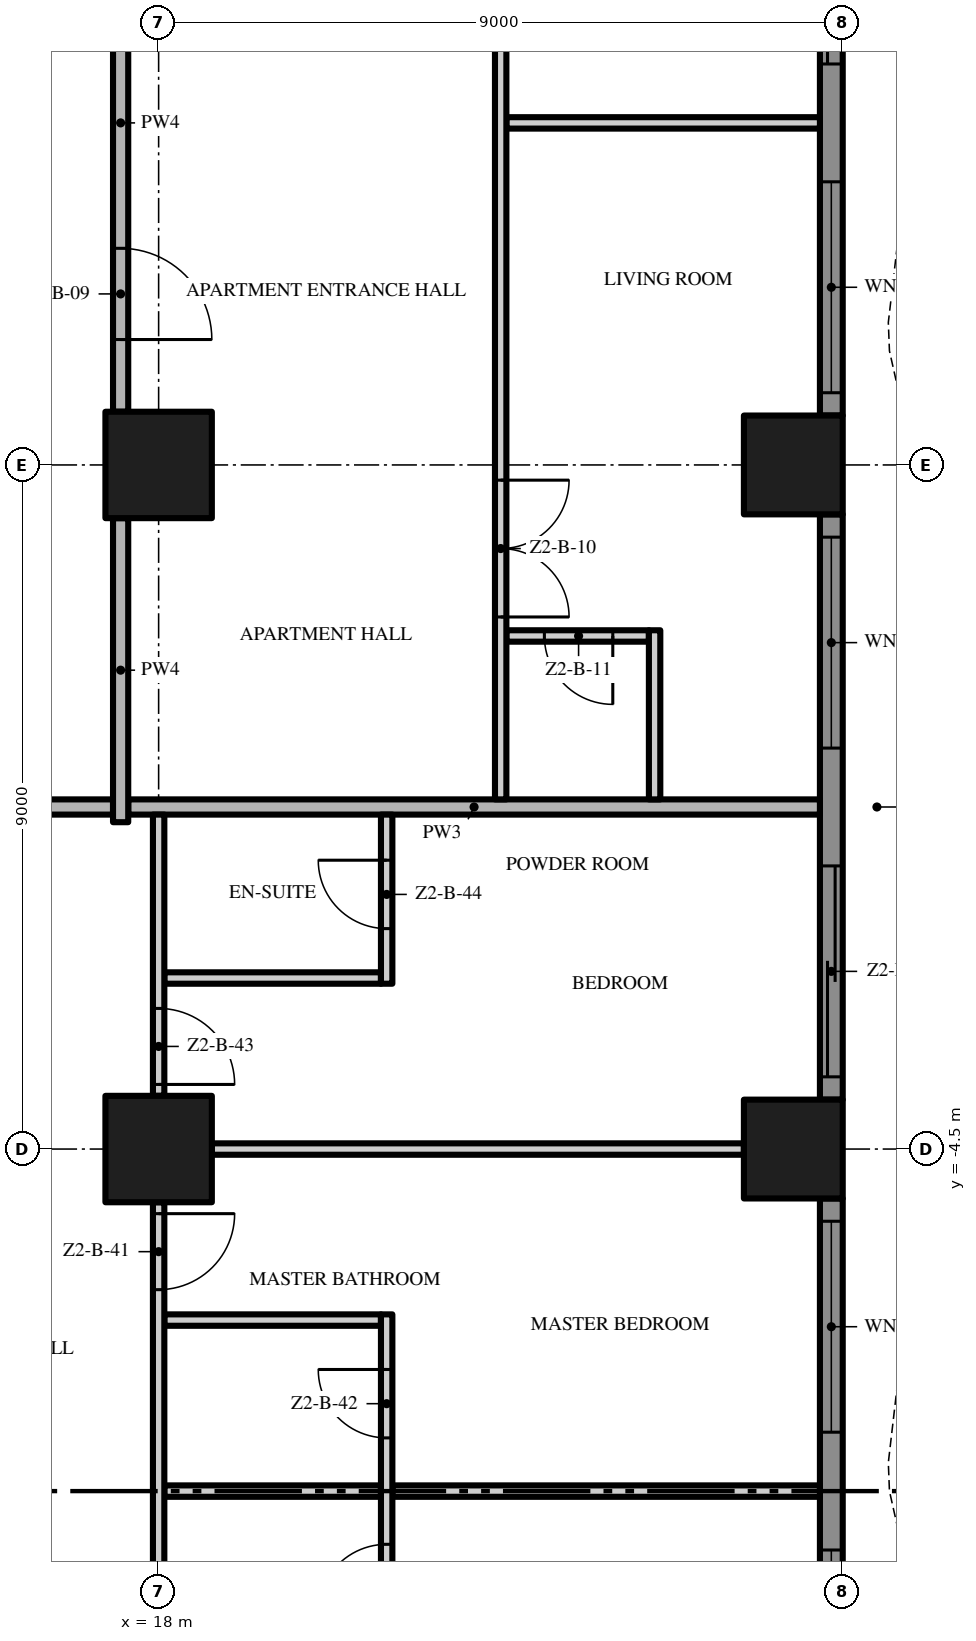
"""IFC4 building model, lengths in metres.
Left out: names, types, materials, properties, quantities, classifications, styles, units other than length and angle.
Written with IfcOpenShell. Run it as: python <this file> out.ifc"""

import sys

from ifc_helpers import new_model, si_unit, direction, frame, frame_2d, origin, origin_2d, place, context, subcontext, project, spatial, polyline, rectangle, outline, extrude, element, fill, save


model = new_model("IFC4")
c1 = context("Model", 3, precision=1e-05, world=origin(), true_north=direction((0.0, 1.0)))
c2 = subcontext(c1, "Body", "Model", "MODEL_VIEW")
j1 = project(units=[si_unit("LENGTHUNIT", "METRE"), si_unit("PLANEANGLEUNIT", "RADIAN")], contexts=[c1])
p1 = place(None, origin())
s1 = spatial("IfcSite", under=j1, at=p1, CompositionType="ELEMENT")
p2 = place(p1, origin())
s2 = spatial("IfcBuilding", under=s1, at=p2, CompositionType="ELEMENT")
p3 = place(p2, frame((0.0, 0.0, 80.8)))
s3 = spatial("IfcBuildingStorey", under=s2, at=p3, CompositionType="ELEMENT", Elevation=80.8)
for number, where, z_axis, x_axis in (
    (1, (18.0, -4.5, 0.0), (0.0, 0.0, 1.0), (1.0, 0.0, 0.0)),
    (2, (18.0, 4.5, 0.0), (0.0, 0.0, 1.0), (1.0, 0.0, 0.0)),
):
    element("IfcColumn", number, at=place(p3, frame(where, z_axis=z_axis, x_axis=x_axis)), inside=s3, PredefinedType="COLUMN", context=c2, shape_type="SweptSolid", body=[
        extrude(rectangle(XDim=1.4, YDim=1.4, at=origin_2d()), origin(), (0.0, 0.0, 1.0), 3.5),
    ])
for number, where, z_axis, x_axis in (
    (3, (26.35, -4.5, 0.0), (0.0, 0.0, 1.0), (1.0, 0.0, 0.0)),
    (4, (26.35, 4.5, 0.0), (0.0, 0.0, 1.0), (1.0, 0.0, 0.0)),
):
    element("IfcColumn", number, at=place(p3, frame(where, z_axis=z_axis, x_axis=x_axis)), inside=s3, PredefinedType="COLUMN", context=c2, shape_type="SweptSolid", body=[
        extrude(rectangle(XDim=1.3, YDim=1.3, at=origin_2d()), origin(), (0.0, 0.0, 1.0), 3.5),
    ])
p4 = place(p3, frame((26.85, -5.15, 0.0), z_axis=(0.0, 0.0, 1.0), x_axis=(0.0, -1.0, 0.0)))
e5 = element("IfcWall", 5, at=p4, inside=s3, PredefinedType="SOLIDWALL", context=c2, shape_type="SweptSolid", body=[
    extrude(rectangle(XDim=7.7, YDim=0.3, at=frame_2d((3.85, 0.0))), origin(), (0.0, 0.0, 1.0), 3.5),
])
p5 = place(p4, frame((4.625, 0.0, 0.45)))
e6 = element("IfcOpeningElement", 6, at=p5, cuts=e5, PredefinedType="OPENING", context=c2, shape_type="SweptSolid", body=[
    extrude(rectangle(XDim=2.775, YDim=2.65, at=frame_2d((1.387, 1.325))), frame((0.0, 0.16, 0.0), z_axis=(0.0, -1.0, 0.0), x_axis=(1.0, 0.0, 0.0)), (0.0, 0.0, 1.0), 0.32),
])
p6 = place(p4, frame((0.3, 0.0, 0.45)))
e7 = element("IfcOpeningElement", 7, at=p6, cuts=e5, PredefinedType="OPENING", context=c2, shape_type="SweptSolid", body=[
    extrude(rectangle(XDim=2.775, YDim=2.65, at=frame_2d((1.387, 1.325))), frame((0.0, 0.16, 0.0), z_axis=(0.0, -1.0, 0.0), x_axis=(1.0, 0.0, 0.0)), (0.0, 0.0, 1.0), 0.32),
])
p7 = place(p3, frame((26.85, 3.85, 0.0), z_axis=(0.0, 0.0, 1.0), x_axis=(0.0, -1.0, 0.0)))
e8 = element("IfcWall", 8, at=p7, inside=s3, PredefinedType="SOLIDWALL", context=c2, shape_type="SweptSolid", body=[
    extrude(rectangle(XDim=7.7, YDim=0.3, at=frame_2d((3.85, 0.0))), origin(), (0.0, 0.0, 1.0), 3.5),
])
p8 = place(p7, frame((4.625, 0.0, 0.0)))
e9 = element("IfcOpeningElement", 9, at=p8, cuts=e8, PredefinedType="OPENING", context=c2, shape_type="SweptSolid", body=[
    extrude(rectangle(XDim=2.775, YDim=2.4, at=frame_2d((1.387, 1.2))), frame((0.0, 0.16, 0.0), z_axis=(0.0, -1.0, 0.0), x_axis=(1.0, 0.0, 0.0)), (0.0, 0.0, 1.0), 0.32),
])
p9 = place(p7, frame((0.3, 0.0, 0.45)))
e10 = element("IfcOpeningElement", 10, at=p9, cuts=e8, PredefinedType="OPENING", context=c2, shape_type="SweptSolid", body=[
    extrude(rectangle(XDim=2.775, YDim=2.65, at=frame_2d((1.387, 1.325))), frame((0.0, 0.16, 0.0), z_axis=(0.0, -1.0, 0.0), x_axis=(1.0, 0.0, 0.0)), (0.0, 0.0, 1.0), 0.32),
])
p10 = place(p3, frame((26.85, 12.85, 0.0), z_axis=(0.0, 0.0, 1.0), x_axis=(0.0, -1.0, 0.0)))
e11 = element("IfcWall", 11, at=p10, inside=s3, PredefinedType="SOLIDWALL", context=c2, shape_type="SweptSolid", body=[
    extrude(rectangle(XDim=7.7, YDim=0.3, at=frame_2d((3.85, 0.0))), origin(), (0.0, 0.0, 1.0), 3.5),
])
p11 = place(p10, frame((4.625, 0.0, 0.45)))
e12 = element("IfcOpeningElement", 12, at=p11, cuts=e11, PredefinedType="OPENING", context=c2, shape_type="SweptSolid", body=[
    extrude(rectangle(XDim=2.775, YDim=2.65, at=frame_2d((1.387, 1.325))), frame((0.0, 0.16, 0.0), z_axis=(0.0, -1.0, 0.0), x_axis=(1.0, 0.0, 0.0)), (0.0, 0.0, 1.0), 0.32),
])
p12 = place(p10, frame((0.3, 0.0, 0.0)))
e13 = element("IfcOpeningElement", 13, at=p12, cuts=e11, PredefinedType="OPENING", context=c2, shape_type="SweptSolid", body=[
    extrude(rectangle(XDim=2.775, YDim=2.4, at=frame_2d((1.387, 1.2))), frame((0.0, 0.16, 0.0), z_axis=(0.0, -1.0, 0.0), x_axis=(1.0, 0.0, 0.0)), (0.0, 0.0, 1.0), 0.32),
])
p13 = place(p3, origin())
e14 = element("IfcWall", 14, at=p13, inside=s3, PredefinedType="USERDEFINED", context=c2, shape_type="SweptSolid", body=[
    extrude(outline(polyline([(29.649, -18.0), (29.985, -16.5), (30.0, -16.125), (29.869, -15.0), (29.345, -13.5), (28.612, -12.0), (27.951, -10.5), (27.615, -9.0), (27.6, -8.625), (27.731, -7.5), (28.255, -6.0), (28.988, -4.5), (29.649, -3.0), (29.985, -1.5), (30.0, -1.125), (29.869, 0.0), (29.345, 1.5), (28.612, 3.0), (27.951, 4.5), (27.615, 6.0), (27.6, 6.375), (27.731, 7.5), (28.255, 9.0), (28.988, 10.5), (29.649, 12.0), (29.985, 13.5), (30.0, 13.875), (29.869, 15.0), (29.345, 16.5), (28.612, 18.0), (28.388, 17.89), (29.114, 16.404), (29.624, 14.944), (29.749, 13.865), (29.736, 13.533), (29.41, 12.079), (28.761, 10.605), (28.024, 9.096), (27.486, 7.556), (27.349, 6.385), (27.366, 5.967), (27.713, 4.421), (28.385, 2.895), (29.114, 1.404), (29.624, -0.056), (29.749, -1.135), (29.736, -1.467), (29.41, -2.921), (28.761, -4.395), (28.024, -5.904), (27.486, -7.444), (27.349, -8.615), (27.366, -9.033), (27.713, -10.579), (28.385, -12.105), (29.114, -13.596), (29.624, -15.056), (29.749, -16.135), (29.736, -16.467), (29.405, -17.945), (29.649, -18.0)])), origin(), (0.0, 0.0, 1.0), 0.9),
])
p14 = place(p3, frame((18.075, -9.0, 0.0), z_axis=(0.0, 0.0, 1.0), x_axis=(1.0, 0.0, 0.0)))
e15 = element("IfcWall", 15, at=p14, inside=s3, PredefinedType="PARTITIONING", context=c2, shape_type="SweptSolid", body=[
    extrude(rectangle(XDim=2.85, YDim=0.15, at=frame_2d((1.425, 0.0))), origin(), (0.0, 0.0, 1.0), 3.5),
])
p15 = place(p3, frame((21.075, -9.0, 0.0), z_axis=(0.0, 0.0, 1.0), x_axis=(1.0, 0.0, 0.0)))
e16 = element("IfcWall", 16, at=p15, inside=s3, PredefinedType="PARTITIONING", context=c2, shape_type="SweptSolid", body=[
    extrude(rectangle(XDim=5.625, YDim=0.15, at=frame_2d((2.812, 0.0))), origin(), (0.0, 0.0, 1.0), 3.5),
])
p16 = place(p3, frame((18.075, -6.75, 0.0), z_axis=(0.0, 0.0, 1.0), x_axis=(1.0, 0.0, 0.0)))
e17 = element("IfcWall", 17, at=p16, inside=s3, PredefinedType="PARTITIONING", context=c2, shape_type="SweptSolid", body=[
    extrude(rectangle(XDim=2.85, YDim=0.15, at=frame_2d((1.425, 0.0))), origin(), (0.0, 0.0, 1.0), 3.5),
])
p17 = place(p3, frame((18.7, -4.5, 0.0), z_axis=(0.0, 0.0, 1.0), x_axis=(1.0, 0.0, 0.0)))
e18 = element("IfcWall", 18, at=p17, inside=s3, PredefinedType="PARTITIONING", context=c2, shape_type="SweptSolid", body=[
    extrude(rectangle(XDim=7.0, YDim=0.15, at=frame_2d((3.5, 0.0))), origin(), (0.0, 0.0, 1.0), 3.5),
])
p18 = place(p3, frame((18.075, -2.25, 0.0), z_axis=(0.0, 0.0, 1.0), x_axis=(1.0, 0.0, 0.0)))
e19 = element("IfcWall", 19, at=p18, inside=s3, PredefinedType="PARTITIONING", context=c2, shape_type="SweptSolid", body=[
    extrude(rectangle(XDim=2.85, YDim=0.15, at=frame_2d((1.425, 0.0))), origin(), (0.0, 0.0, 1.0), 3.5),
])
p19 = place(p3, frame((4.6, 0.0, 0.0), z_axis=(0.0, 0.0, 1.0), x_axis=(1.0, 0.0, 0.0)))
e20 = element("IfcWall", 20, at=p19, inside=s3, PredefinedType="PARTITIONING", context=c2, shape_type="SweptSolid", body=[
    extrude(rectangle(XDim=12.8, YDim=0.2, at=frame_2d((6.4, 0.0))), origin(), (0.0, 0.0, 1.0), 3.5),
])
p20 = place(p3, frame((17.6, 0.0, 0.0), z_axis=(0.0, 0.0, 1.0), x_axis=(1.0, 0.0, 0.0)))
e21 = element("IfcWall", 21, at=p20, inside=s3, PredefinedType="PARTITIONING", context=c2, shape_type="SweptSolid", body=[
    extrude(rectangle(XDim=9.1, YDim=0.2, at=frame_2d((4.55, 0.0))), origin(), (0.0, 0.0, 1.0), 3.5),
])
p21 = place(p3, frame((24.45, 2.25, 0.0), z_axis=(0.0, 0.0, 1.0), x_axis=(-1.0, 0.0, 0.0)))
e22 = element("IfcWall", 22, at=p21, inside=s3, PredefinedType="PARTITIONING", context=c2, shape_type="SweptSolid", body=[
    extrude(rectangle(XDim=1.875, YDim=0.15, at=frame_2d((0.938, 0.0))), origin(), (0.0, 0.0, 1.0), 3.5),
])
p22 = place(p21, frame((0.475, 0.0, 0.0)))
e23 = element("IfcOpeningElement", 23, at=p22, cuts=e22, PredefinedType="OPENING", context=c2, shape_type="SweptSolid", body=[
    extrude(rectangle(XDim=0.9, YDim=2.1, at=frame_2d((0.45, 1.05))), frame((0.0, 0.085, 0.0), z_axis=(0.0, -1.0, 0.0), x_axis=(1.0, 0.0, 0.0)), (0.0, 0.0, 1.0), 0.17),
])
p23 = place(p3, frame((22.575, 9.0, 0.0), z_axis=(0.0, 0.0, 1.0), x_axis=(1.0, 0.0, 0.0)))
e24 = element("IfcWall", 24, at=p23, inside=s3, PredefinedType="PARTITIONING", context=c2, shape_type="SweptSolid", body=[
    extrude(rectangle(XDim=4.125, YDim=0.15, at=frame_2d((2.062, 0.0))), origin(), (0.0, 0.0, 1.0), 3.5),
])
p24 = place(p3, frame((17.5, -0.2, 0.0), z_axis=(0.0, 0.0, 1.0), x_axis=(0.0, 1.0, 0.0)))
e25 = element("IfcWall", 25, at=p24, inside=s3, PredefinedType="PARTITIONING", context=c2, shape_type="SweptSolid", body=[
    extrude(rectangle(XDim=4.0, YDim=0.2, at=frame_2d((2.0, 0.0))), origin(), (0.0, 0.0, 1.0), 3.5),
])
p25 = place(p3, frame((17.5, 12.8, 0.0), z_axis=(0.0, 0.0, 1.0), x_axis=(0.0, -1.0, 0.0)))
e26 = element("IfcWall", 26, at=p25, inside=s3, PredefinedType="PARTITIONING", context=c2, shape_type="SweptSolid", body=[
    extrude(rectangle(XDim=7.6, YDim=0.2, at=frame_2d((3.8, 0.0))), origin(), (0.0, 0.0, 1.0), 3.5),
])
p26 = place(p25, frame((5.45, 0.0, 0.0)))
e27 = element("IfcOpeningElement", 27, at=p26, cuts=e26, PredefinedType="OPENING", context=c2, shape_type="SweptSolid", body=[
    extrude(rectangle(XDim=1.2, YDim=2.4, at=frame_2d((0.6, 1.2))), frame((0.0, 0.11, 0.0), z_axis=(0.0, -1.0, 0.0), x_axis=(1.0, 0.0, 0.0)), (0.0, 0.0, 1.0), 0.22),
])
p27 = place(p3, frame((18.0, -5.2, 0.0), z_axis=(0.0, 0.0, 1.0), x_axis=(0.0, -1.0, 0.0)))
e28 = element("IfcWall", 28, at=p27, inside=s3, PredefinedType="PARTITIONING", context=c2, shape_type="SweptSolid", body=[
    extrude(rectangle(XDim=7.6, YDim=0.15, at=frame_2d((3.8, 0.0))), origin(), (0.0, 0.0, 1.0), 3.5),
])
p28 = place(p27, frame((0.15, 0.0, 0.0)))
e29 = element("IfcOpeningElement", 29, at=p28, cuts=e28, PredefinedType="OPENING", context=c2, shape_type="SweptSolid", body=[
    extrude(rectangle(XDim=1.0, YDim=2.4, at=frame_2d((0.5, 1.2))), frame((0.0, 0.085, 0.0), z_axis=(0.0, -1.0, 0.0), x_axis=(1.0, 0.0, 0.0)), (0.0, 0.0, 1.0), 0.17),
])
p29 = place(p3, frame((18.0, -0.1, 0.0), z_axis=(0.0, 0.0, 1.0), x_axis=(0.0, -1.0, 0.0)))
e30 = element("IfcWall", 30, at=p29, inside=s3, PredefinedType="PARTITIONING", context=c2, shape_type="SweptSolid", body=[
    extrude(rectangle(XDim=3.7, YDim=0.15, at=frame_2d((1.85, 0.0))), origin(), (0.0, 0.0, 1.0), 3.5),
])
p30 = place(p29, frame((2.55, 0.0, 0.0)))
e31 = element("IfcOpeningElement", 31, at=p30, cuts=e30, PredefinedType="OPENING", context=c2, shape_type="SweptSolid", body=[
    extrude(rectangle(XDim=1.0, YDim=2.4, at=frame_2d((0.5, 1.2))), frame((0.0, 0.085, 0.0), z_axis=(0.0, -1.0, 0.0), x_axis=(1.0, 0.0, 0.0)), (0.0, 0.0, 1.0), 0.17),
])
p31 = place(p3, frame((21.0, -11.325, 0.0), z_axis=(0.0, 0.0, 1.0), x_axis=(0.0, 1.0, 0.0)))
e32 = element("IfcWall", 32, at=p31, inside=s3, PredefinedType="PARTITIONING", context=c2, shape_type="SweptSolid", body=[
    extrude(rectangle(XDim=4.65, YDim=0.15, at=frame_2d((2.325, 0.0))), origin(), (0.0, 0.0, 1.0), 3.5),
])
p32 = place(p31, frame((0.725, 0.0, 0.0)))
e33 = element("IfcOpeningElement", 33, at=p32, cuts=e32, PredefinedType="OPENING", context=c2, shape_type="SweptSolid", body=[
    extrude(rectangle(XDim=0.9, YDim=2.1, at=frame_2d((0.45, 1.05))), frame((0.0, 0.085, 0.0), z_axis=(0.0, -1.0, 0.0), x_axis=(1.0, 0.0, 0.0)), (0.0, 0.0, 1.0), 0.17),
])
p33 = place(p31, frame((3.025, 0.0, 0.0)))
e34 = element("IfcOpeningElement", 34, at=p33, cuts=e32, PredefinedType="OPENING", context=c2, shape_type="SweptSolid", body=[
    extrude(rectangle(XDim=0.9, YDim=2.1, at=frame_2d((0.45, 1.05))), frame((0.0, 0.085, 0.0), z_axis=(0.0, -1.0, 0.0), x_axis=(1.0, 0.0, 0.0)), (0.0, 0.0, 1.0), 0.17),
])
p34 = place(p3, frame((21.0, -2.325, 0.0), z_axis=(0.0, 0.0, 1.0), x_axis=(0.0, 1.0, 0.0)))
e35 = element("IfcWall", 35, at=p34, inside=s3, PredefinedType="PARTITIONING", context=c2, shape_type="SweptSolid", body=[
    extrude(rectangle(XDim=2.225, YDim=0.15, at=frame_2d((1.113, 0.0))), origin(), (0.0, 0.0, 1.0), 3.5),
])
p35 = place(p34, frame((0.725, 0.0, 0.0)))
e36 = element("IfcOpeningElement", 36, at=p35, cuts=e35, PredefinedType="OPENING", context=c2, shape_type="SweptSolid", body=[
    extrude(rectangle(XDim=0.9, YDim=2.1, at=frame_2d((0.45, 1.05))), frame((0.0, 0.085, 0.0), z_axis=(0.0, -1.0, 0.0), x_axis=(1.0, 0.0, 0.0)), (0.0, 0.0, 1.0), 0.17),
])
p36 = place(p3, frame((22.5, 17.35, 0.0), z_axis=(0.0, 0.0, 1.0), x_axis=(0.0, -1.0, 0.0)))
e37 = element("IfcWall", 37, at=p36, inside=s3, PredefinedType="PARTITIONING", context=c2, shape_type="SweptSolid", body=[
    extrude(rectangle(XDim=17.25, YDim=0.15, at=frame_2d((8.625, 0.0))), origin(), (0.0, 0.0, 1.0), 3.5),
])
p37 = place(p36, frame((13.05, 0.0, 0.0)))
e38 = element("IfcOpeningElement", 38, at=p37, cuts=e37, PredefinedType="OPENING", context=c2, shape_type="SweptSolid", body=[
    extrude(rectangle(XDim=1.8, YDim=2.4, at=frame_2d((0.9, 1.2))), frame((0.0, 0.085, 0.0), z_axis=(0.0, -1.0, 0.0), x_axis=(1.0, 0.0, 0.0)), (0.0, 0.0, 1.0), 0.17),
])
p38 = place(p36, frame((5.6, 0.0, 0.0)))
e39 = element("IfcOpeningElement", 39, at=p38, cuts=e37, PredefinedType="OPENING", context=c2, shape_type="SweptSolid", body=[
    extrude(rectangle(XDim=1.0, YDim=2.4, at=frame_2d((0.5, 1.2))), frame((0.0, 0.085, 0.0), z_axis=(0.0, -1.0, 0.0), x_axis=(1.0, 0.0, 0.0)), (0.0, 0.0, 1.0), 0.17),
])
p39 = place(p3, frame((24.525, 0.1, 0.0), z_axis=(0.0, 0.0, 1.0), x_axis=(0.0, 1.0, 0.0)))
e40 = element("IfcWall", 40, at=p39, inside=s3, PredefinedType="PARTITIONING", context=c2, shape_type="SweptSolid", body=[
    extrude(rectangle(XDim=2.225, YDim=0.15, at=frame_2d((1.113, 0.0))), origin(), (0.0, 0.0, 1.0), 3.5),
])
p40 = place(p5, origin())
e41 = element("IfcWindow", 41, at=p40, inside=s3, PartitioningType="SINGLE_PANEL", PredefinedType="WINDOW", context=c2, shape_type="SweptSolid", body=[
    extrude(rectangle(XDim=2.775, YDim=2.65, at=frame_2d((1.387, 1.325))), frame((0.0, 0.03, 0.0), z_axis=(0.0, -1.0, 0.0), x_axis=(1.0, 0.0, 0.0)), (0.0, 0.0, 1.0), 0.06),
])
fill(e6, e41)
p41 = place(p6, origin())
e42 = element("IfcWindow", 42, at=p41, inside=s3, PartitioningType="SINGLE_PANEL", PredefinedType="WINDOW", context=c2, shape_type="SweptSolid", body=[
    extrude(rectangle(XDim=2.775, YDim=2.65, at=frame_2d((1.387, 1.325))), frame((0.0, 0.03, 0.0), z_axis=(0.0, -1.0, 0.0), x_axis=(1.0, 0.0, 0.0)), (0.0, 0.0, 1.0), 0.06),
])
fill(e7, e42)
p42 = place(p8, origin())
e43 = element("IfcDoor", 43, at=p42, inside=s3, OperationType="SINGLE_SWING_LEFT", PredefinedType="DOOR", context=c2, shape_type="SweptSolid", body=[
    extrude(rectangle(XDim=2.775, YDim=2.4, at=frame_2d((1.387, 1.2))), frame((0.0, 0.025, 0.0), z_axis=(0.0, -1.0, 0.0), x_axis=(1.0, 0.0, 0.0)), (0.0, 0.0, 1.0), 0.05),
])
fill(e9, e43)
p43 = place(p9, origin())
e44 = element("IfcWindow", 44, at=p43, inside=s3, PartitioningType="SINGLE_PANEL", PredefinedType="WINDOW", context=c2, shape_type="SweptSolid", body=[
    extrude(rectangle(XDim=2.775, YDim=2.65, at=frame_2d((1.387, 1.325))), frame((0.0, 0.03, 0.0), z_axis=(0.0, -1.0, 0.0), x_axis=(1.0, 0.0, 0.0)), (0.0, 0.0, 1.0), 0.06),
])
fill(e10, e44)
p44 = place(p11, origin())
e45 = element("IfcWindow", 45, at=p44, inside=s3, PartitioningType="SINGLE_PANEL", PredefinedType="WINDOW", context=c2, shape_type="SweptSolid", body=[
    extrude(rectangle(XDim=2.775, YDim=2.65, at=frame_2d((1.387, 1.325))), frame((0.0, 0.03, 0.0), z_axis=(0.0, -1.0, 0.0), x_axis=(1.0, 0.0, 0.0)), (0.0, 0.0, 1.0), 0.06),
])
fill(e12, e45)
p45 = place(p12, origin())
e46 = element("IfcDoor", 46, at=p45, inside=s3, OperationType="SINGLE_SWING_LEFT", PredefinedType="DOOR", context=c2, shape_type="SweptSolid", body=[
    extrude(rectangle(XDim=2.775, YDim=2.4, at=frame_2d((1.387, 1.2))), frame((0.0, 0.025, 0.0), z_axis=(0.0, -1.0, 0.0), x_axis=(1.0, 0.0, 0.0)), (0.0, 0.0, 1.0), 0.05),
])
fill(e13, e46)
p46 = place(p26, origin())
e47 = element("IfcDoor", 47, at=p46, inside=s3, OperationType="SINGLE_SWING_RIGHT", PredefinedType="DOOR", context=c2, shape_type="SweptSolid", body=[
    extrude(rectangle(XDim=1.2, YDim=2.4, at=frame_2d((0.6, 1.2))), frame((0.0, 0.025, 0.0), z_axis=(0.0, -1.0, 0.0), x_axis=(1.0, 0.0, 0.0)), (0.0, 0.0, 1.0), 0.05),
])
fill(e27, e47)
p47 = place(p37, origin())
e48 = element("IfcDoor", 48, at=p47, inside=s3, OperationType="DOUBLE_DOOR_SINGLE_SWING", PredefinedType="DOOR", context=c2, shape_type="SweptSolid", body=[
    extrude(rectangle(XDim=1.8, YDim=2.4, at=frame_2d((0.9, 1.2))), frame((0.0, 0.025, 0.0), z_axis=(0.0, -1.0, 0.0), x_axis=(1.0, 0.0, 0.0)), (0.0, 0.0, 1.0), 0.05),
])
fill(e38, e48)
p48 = place(p22, origin())
e49 = element("IfcDoor", 49, at=p48, inside=s3, OperationType="SINGLE_SWING_LEFT", PredefinedType="DOOR", context=c2, shape_type="SweptSolid", body=[
    extrude(rectangle(XDim=0.9, YDim=2.1, at=frame_2d((0.45, 1.05))), frame((0.0, 0.025, 0.0), z_axis=(0.0, -1.0, 0.0), x_axis=(1.0, 0.0, 0.0)), (0.0, 0.0, 1.0), 0.05),
])
fill(e23, e49)
p49 = place(p32, origin())
e50 = element("IfcDoor", 50, at=p49, inside=s3, OperationType="SINGLE_SWING_LEFT", PredefinedType="DOOR", context=c2, shape_type="SweptSolid", body=[
    extrude(rectangle(XDim=0.9, YDim=2.1, at=frame_2d((0.45, 1.05))), frame((0.0, 0.025, 0.0), z_axis=(0.0, -1.0, 0.0), x_axis=(1.0, 0.0, 0.0)), (0.0, 0.0, 1.0), 0.05),
])
fill(e33, e50)
p50 = place(p28, origin())
e51 = element("IfcDoor", 51, at=p50, inside=s3, OperationType="SINGLE_SWING_LEFT", PredefinedType="DOOR", context=c2, shape_type="SweptSolid", body=[
    extrude(rectangle(XDim=1.0, YDim=2.4, at=frame_2d((0.5, 1.2))), frame((0.0, 0.025, 0.0), z_axis=(0.0, -1.0, 0.0), x_axis=(1.0, 0.0, 0.0)), (0.0, 0.0, 1.0), 0.05),
])
fill(e29, e51)
p51 = place(p33, origin())
e52 = element("IfcDoor", 52, at=p51, inside=s3, OperationType="SINGLE_SWING_RIGHT", PredefinedType="DOOR", context=c2, shape_type="SweptSolid", body=[
    extrude(rectangle(XDim=0.9, YDim=2.1, at=frame_2d((0.45, 1.05))), frame((0.0, 0.025, 0.0), z_axis=(0.0, -1.0, 0.0), x_axis=(1.0, 0.0, 0.0)), (0.0, 0.0, 1.0), 0.05),
])
fill(e34, e52)
p52 = place(p30, origin())
e53 = element("IfcDoor", 53, at=p52, inside=s3, OperationType="SINGLE_SWING_RIGHT", PredefinedType="DOOR", context=c2, shape_type="SweptSolid", body=[
    extrude(rectangle(XDim=1.0, YDim=2.4, at=frame_2d((0.5, 1.2))), frame((0.0, 0.025, 0.0), z_axis=(0.0, -1.0, 0.0), x_axis=(1.0, 0.0, 0.0)), (0.0, 0.0, 1.0), 0.05),
])
fill(e31, e53)
p53 = place(p35, origin())
e54 = element("IfcDoor", 54, at=p53, inside=s3, OperationType="SINGLE_SWING_RIGHT", PredefinedType="DOOR", context=c2, shape_type="SweptSolid", body=[
    extrude(rectangle(XDim=0.9, YDim=2.1, at=frame_2d((0.45, 1.05))), frame((0.0, 0.025, 0.0), z_axis=(0.0, -1.0, 0.0), x_axis=(1.0, 0.0, 0.0)), (0.0, 0.0, 1.0), 0.05),
])
fill(e36, e54)
save(model, sys.argv[1])
